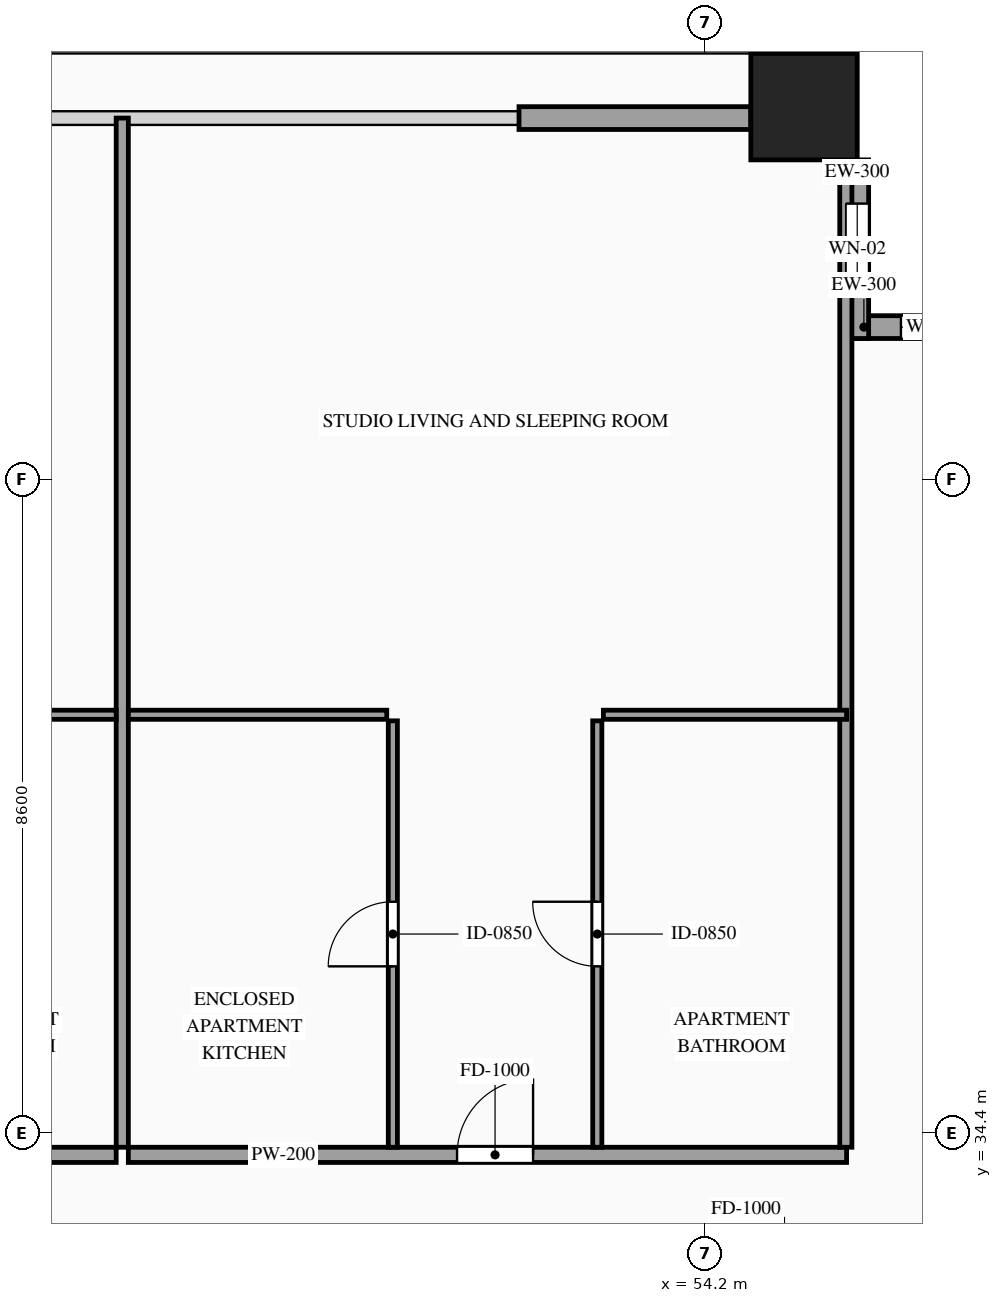
"""IFC4 building model, lengths in metres.
Left out: names, types, materials, properties, quantities, classifications, styles, units other than length and angle.
Written with IfcOpenShell. Run it as: python <this file> out.ifc"""

import sys

from ifc_helpers import new_model, si_unit, direction, frame, frame_2d, origin, origin_2d, place, context, subcontext, project, spatial, rectangle, hollow_rectangle, extrude, source, transform, mapped, element, fill, save


model = new_model("IFC4")
c1 = context("Model", 3, precision=1e-05, world=origin(), true_north=direction((0.0, 1.0)))
c2 = subcontext(c1, "Body", "Model", "MODEL_VIEW")
j1 = project(units=[si_unit("LENGTHUNIT", "METRE"), si_unit("PLANEANGLEUNIT", "RADIAN")], contexts=[c1])
p1 = place(None, origin())
s1 = spatial("IfcSite", under=j1, at=p1, CompositionType="ELEMENT")
p2 = place(p1, origin())
s2 = spatial("IfcBuilding", under=s1, at=p2, CompositionType="ELEMENT")
p3 = place(p2, frame((0.0, 0.0, 184.5)))
s3 = spatial("IfcBuildingStorey", under=s2, at=p3, CompositionType="ELEMENT", Elevation=184.5)
m1 = source(origin(), c2, "Body", "SweptSolid", [
    extrude(hollow_rectangle(XDim=1.4, YDim=1.4, WallThickness=0.06, at=origin_2d()), origin(), (0.0, 0.0, 1.0), 3.5),
])
p4 = place(p3, frame((55.5, 47.9, 0.0), z_axis=(0.0, 0.0, 1.0), x_axis=(1.0, 0.0, 0.0)))
e1 = element("IfcColumn", 1, at=p4, inside=s3, PredefinedType="COLUMN", context=c2, shape_type="MappedRepresentation", body=[
    mapped(m1, transform((0.0, 0.0, 0.0), scale=1.0)),
])
p5 = place(p3, frame((58.4, 45.0, 0.0), z_axis=(0.0, 0.0, 1.0), x_axis=(-1.0, 0.0, 0.0)))
e2 = element("IfcWall", 2, at=p5, inside=s3, PredefinedType="SOLIDWALL", context=c2, shape_type="SweptSolid", body=[
    extrude(rectangle(XDim=2.35, YDim=0.3, at=frame_2d((1.175, 0.0))), origin(), (0.0, 0.0, 1.0), 3.28),
])
p6 = place(p5, frame((0.725, 0.0, 0.85)))
e3 = element("IfcOpeningElement", 3, at=p6, cuts=e2, PredefinedType="OPENING", context=c2, shape_type="SweptSolid", body=[
    extrude(rectangle(XDim=0.9, YDim=1.5, at=frame_2d((0.45, 0.75))), frame((0.0, 0.165, 0.0), z_axis=(0.0, -1.0, 0.0), x_axis=(1.0, 0.0, 0.0)), (0.0, 0.0, 1.0), 0.33),
])
p7 = place(p3, frame((56.2, 44.85, 0.0), z_axis=(0.0, 0.0, 1.0), x_axis=(0.0, 1.0, 0.0)))
e4 = element("IfcWall", 4, at=p7, inside=s3, PredefinedType="SOLIDWALL", context=c2, shape_type="SweptSolid", body=[
    extrude(rectangle(XDim=2.35, YDim=0.3, at=frame_2d((1.175, 0.0))), origin(), (0.0, 0.0, 1.0), 3.28),
])
p8 = place(p7, frame((0.575, 0.0, 0.85)))
e5 = element("IfcOpeningElement", 5, at=p8, cuts=e4, PredefinedType="OPENING", context=c2, shape_type="SweptSolid", body=[
    extrude(rectangle(XDim=1.2, YDim=2.1, at=frame_2d((0.6, 1.05))), frame((0.0, 0.165, 0.0), z_axis=(0.0, -1.0, 0.0), x_axis=(1.0, 0.0, 0.0)), (0.0, 0.0, 1.0), 0.33),
])
m2 = source(origin(), c2, "Body", "SweptSolid", [
    extrude(rectangle(XDim=3.05, YDim=0.3, at=frame_2d((1.525, 0.0))), origin(), (0.0, 0.0, 1.0), 2.835),
])
p9 = place(p3, frame((51.75, 47.75, 0.0), z_axis=(0.0, 0.0, 1.0), x_axis=(1.0, 0.0, 0.0)))
e6 = element("IfcWall", 6, at=p9, inside=s3, PredefinedType="SOLIDWALL", context=c2, shape_type="MappedRepresentation", body=[
    mapped(m2, transform((0.0, 0.0, 0.0), scale=1.0)),
])
p10 = place(p3, frame((37.08, 34.11, 0.0), z_axis=(0.0, 0.0, 1.0), x_axis=(1.0, 0.0, 0.0)))
e7 = element("IfcWall", 7, at=p10, inside=s3, PredefinedType="PARTITIONING", context=c2, shape_type="SweptSolid", body=[
    extrude(rectangle(XDim=9.37, YDim=0.2, at=frame_2d((4.685, 0.0))), origin(), (0.0, 0.0, 1.0), 3.28),
])
p11 = place(p10, frame((4.282, 0.0, 0.0)))
e8 = element("IfcOpeningElement", 8, at=p11, cuts=e7, PredefinedType="OPENING", context=c2, shape_type="SweptSolid", body=[
    extrude(rectangle(XDim=1.0, YDim=2.2, at=frame_2d((0.5, 1.1))), frame((0.0, 0.115, 0.0), z_axis=(0.0, -1.0, 0.0), x_axis=(1.0, 0.0, 0.0)), (0.0, 0.0, 1.0), 0.23),
])
m3 = source(origin(), c2, "Body", "SweptSolid", [
    extrude(rectangle(XDim=13.54, YDim=0.16, at=frame_2d((6.77, 0.0))), origin(), (0.0, 0.0, 1.0), 3.28),
])
p12 = place(p3, frame((46.53, 34.21, 0.0), z_axis=(0.0, 0.0, 1.0), x_axis=(0.0, 1.0, 0.0)))
e9 = element("IfcWall", 9, at=p12, inside=s3, PredefinedType="PARTITIONING", context=c2, shape_type="MappedRepresentation", body=[
    mapped(m3, transform((0.0, 0.0, 0.0), scale=1.0)),
])
m4 = source(origin(), c2, "Body", "SweptSolid", [
    extrude(rectangle(XDim=3.2, YDim=0.12, at=frame_2d((1.6, 0.0))), origin(), (0.0, 0.0, 1.0), 2.875),
])
p13 = place(p3, frame((43.25, 39.9, 0.0), z_axis=(0.0, 0.0, 1.0), x_axis=(1.0, 0.0, 0.0)))
e10 = element("IfcWall", 10, at=p13, inside=s3, PredefinedType="PARTITIONING", context=c2, shape_type="MappedRepresentation", body=[
    mapped(m4, transform((0.0, 0.0, 0.0), scale=1.0)),
])
p14 = place(p3, frame((46.61, 34.11, 0.0), z_axis=(0.0, 0.0, 1.0), x_axis=(1.0, 0.0, 0.0)))
e11 = element("IfcWall", 11, at=p14, inside=s3, PredefinedType="PARTITIONING", context=c2, shape_type="SweptSolid", body=[
    extrude(rectangle(XDim=9.45, YDim=0.2, at=frame_2d((4.725, 0.0))), origin(), (0.0, 0.0, 1.0), 3.28),
])
p15 = place(p14, frame((4.325, 0.0, 0.0)))
e12 = element("IfcOpeningElement", 12, at=p15, cuts=e11, PredefinedType="OPENING", context=c2, shape_type="SweptSolid", body=[
    extrude(rectangle(XDim=1.0, YDim=2.2, at=frame_2d((0.5, 1.1))), frame((0.0, 0.115, 0.0), z_axis=(0.0, -1.0, 0.0), x_axis=(1.0, 0.0, 0.0)), (0.0, 0.0, 1.0), 0.23),
])
m5 = source(origin(), c2, "Body", "SweptSolid", [
    extrude(rectangle(XDim=13.39, YDim=0.16, at=frame_2d((6.695, 0.0))), origin(), (0.0, 0.0, 1.0), 3.28),
])
p16 = place(p3, frame((56.05, 34.21, 0.0), z_axis=(0.0, 0.0, 1.0), x_axis=(0.0, 1.0, 0.0)))
e13 = element("IfcWall", 13, at=p16, inside=s3, PredefinedType="PARTITIONING", context=c2, shape_type="MappedRepresentation", body=[
    mapped(m5, transform((0.0, 0.0, 0.0), scale=1.0)),
])
m6 = source(origin(), c2, "Body", "SweptSolid", [
    extrude(rectangle(XDim=3.4, YDim=0.12, at=frame_2d((1.7, 0.0))), origin(), (0.0, 0.0, 1.0), 2.875),
])
p17 = place(p3, frame((46.61, 39.9, 0.0), z_axis=(0.0, 0.0, 1.0), x_axis=(1.0, 0.0, 0.0)))
e14 = element("IfcWall", 14, at=p17, inside=s3, PredefinedType="PARTITIONING", context=c2, shape_type="MappedRepresentation", body=[
    mapped(m6, transform((0.0, 0.0, 0.0), scale=1.0)),
])
p18 = place(p3, frame((50.09, 34.21, 0.0), z_axis=(0.0, 0.0, 1.0), x_axis=(0.0, 1.0, 0.0)))
e15 = element("IfcWall", 15, at=p18, inside=s3, PredefinedType="PARTITIONING", context=c2, shape_type="SweptSolid", body=[
    extrude(rectangle(XDim=5.61, YDim=0.12, at=frame_2d((2.805, 0.0))), origin(), (0.0, 0.0, 1.0), 2.775),
])
p19 = place(p18, frame((2.38, 0.0, 0.0)))
e16 = element("IfcOpeningElement", 16, at=p19, cuts=e15, PredefinedType="OPENING", context=c2, shape_type="SweptSolid", body=[
    extrude(rectangle(XDim=0.85, YDim=2.1, at=frame_2d((0.425, 1.05))), frame((0.0, 0.075, 0.0), z_axis=(0.0, -1.0, 0.0), x_axis=(1.0, 0.0, 0.0)), (0.0, 0.0, 1.0), 0.15),
])
m7 = source(origin(), c2, "Body", "SweptSolid", [
    extrude(rectangle(XDim=3.2, YDim=0.12, at=frame_2d((1.6, 0.0))), origin(), (0.0, 0.0, 1.0), 3.28),
])
p20 = place(p3, frame((52.86, 39.9, 0.0), z_axis=(0.0, 0.0, 1.0), x_axis=(1.0, 0.0, 0.0)))
e17 = element("IfcWall", 17, at=p20, inside=s3, PredefinedType="PARTITIONING", context=c2, shape_type="MappedRepresentation", body=[
    mapped(m7, transform((0.0, 0.0, 0.0), scale=1.0)),
])
p21 = place(p3, frame((52.78, 34.21, 0.0), z_axis=(0.0, 0.0, 1.0), x_axis=(0.0, 1.0, 0.0)))
e18 = element("IfcWall", 18, at=p21, inside=s3, PredefinedType="PARTITIONING", context=c2, shape_type="SweptSolid", body=[
    extrude(rectangle(XDim=5.61, YDim=0.12, at=frame_2d((2.805, 0.0))), origin(), (0.0, 0.0, 1.0), 3.28),
])
p22 = place(p21, frame((2.38, 0.0, 0.0)))
e19 = element("IfcOpeningElement", 19, at=p22, cuts=e18, PredefinedType="OPENING", context=c2, shape_type="SweptSolid", body=[
    extrude(rectangle(XDim=0.85, YDim=2.1, at=frame_2d((0.425, 1.05))), frame((0.0, 0.075, 0.0), z_axis=(0.0, -1.0, 0.0), x_axis=(1.0, 0.0, 0.0)), (0.0, 0.0, 1.0), 0.15),
])
m8 = source(origin(), c2, "Body", "SweptSolid", [
    extrude(rectangle(XDim=0.9, YDim=1.5, at=frame_2d((0.45, 0.75))), frame((0.0, 0.03, 0.0), z_axis=(0.0, -1.0, 0.0), x_axis=(1.0, 0.0, 0.0)), (0.0, 0.0, 1.0), 0.06),
])
p23 = place(p6, origin())
e20 = element("IfcWindow", 20, at=p23, inside=s3, PartitioningType="SINGLE_PANEL", PredefinedType="WINDOW", context=c2, shape_type="MappedRepresentation", body=[
    mapped(m8, transform((0.0, 0.0, 0.0), scale=1.0)),
])
fill(e3, e20)
m9 = source(origin(), c2, "Body", "SweptSolid", [
    extrude(rectangle(XDim=1.2, YDim=2.1, at=frame_2d((0.6, 1.05))), frame((0.0, 0.03, 0.0), z_axis=(0.0, -1.0, 0.0), x_axis=(1.0, 0.0, 0.0)), (0.0, 0.0, 1.0), 0.06),
])
p24 = place(p8, origin())
e21 = element("IfcWindow", 21, at=p24, inside=s3, PartitioningType="SINGLE_PANEL", PredefinedType="WINDOW", context=c2, shape_type="MappedRepresentation", body=[
    mapped(m9, transform((0.0, 0.0, 0.0), scale=1.0)),
])
fill(e5, e21)
m10 = source(origin(), c2, "Body", "SweptSolid", [
    extrude(rectangle(XDim=1.0, YDim=2.2, at=frame_2d((0.5, 1.1))), frame((0.0, 0.025, 0.0), z_axis=(0.0, -1.0, 0.0), x_axis=(1.0, 0.0, 0.0)), (0.0, 0.0, 1.0), 0.05),
])
p25 = place(p15, origin())
e22 = element("IfcDoor", 22, at=p25, inside=s3, OperationType="SINGLE_SWING_RIGHT", PredefinedType="DOOR", context=c2, shape_type="MappedRepresentation", body=[
    mapped(m10, transform((0.0, 0.0, 0.0), scale=1.0)),
])
fill(e12, e22)
m11 = source(origin(), c2, "Body", "SweptSolid", [
    extrude(rectangle(XDim=0.85, YDim=2.1, at=frame_2d((0.425, 1.05))), frame((0.0, 0.025, 0.0), z_axis=(0.0, -1.0, 0.0), x_axis=(1.0, 0.0, 0.0)), (0.0, 0.0, 1.0), 0.05),
])
p26 = place(p19, origin())
e23 = element("IfcDoor", 23, at=p26, inside=s3, OperationType="SINGLE_SWING_LEFT", PredefinedType="DOOR", context=c2, shape_type="MappedRepresentation", body=[
    mapped(m11, transform((0.0, 0.0, 0.0), scale=1.0)),
])
fill(e16, e23)
p27 = place(p22, origin())
e24 = element("IfcDoor", 24, at=p27, inside=s3, OperationType="SINGLE_SWING_RIGHT", PredefinedType="DOOR", context=c2, shape_type="MappedRepresentation", body=[
    mapped(m11, transform((0.0, 0.0, 0.0), scale=1.0)),
])
fill(e19, e24)
save(model, sys.argv[1])
